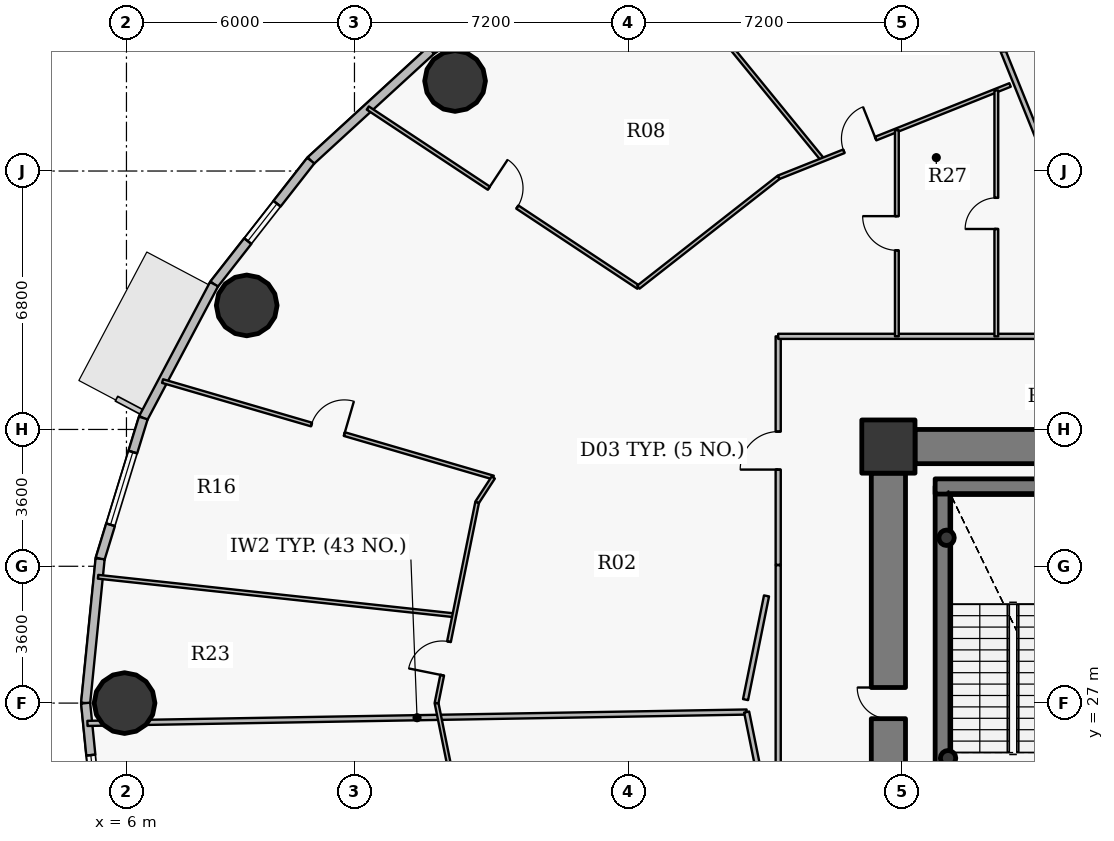
"""IFC4 building model, lengths in metres.
Left out: names, types, materials, properties, quantities, classifications, styles, units other than length and angle.
Written with IfcOpenShell. Run it as: python <this file> out.ifc"""

import sys

from ifc_helpers import new_model, si_unit, direction, frame, frame_2d, origin, origin_2d, place, context, subcontext, project, spatial, rectangle, hollow_circle, extrude, source, transform, mapped, element, fill, save


model = new_model("IFC4")
c1 = context("Model", 3, precision=1e-05, world=origin(), true_north=direction((0.0, 1.0)))
c2 = subcontext(c1, "Body", "Model", "MODEL_VIEW")
j1 = project(units=[si_unit("LENGTHUNIT", "METRE"), si_unit("PLANEANGLEUNIT", "RADIAN")], contexts=[c1])
p1 = place(None, origin())
s1 = spatial("IfcSite", under=j1, at=p1, CompositionType="ELEMENT")
p2 = place(p1, origin())
s2 = spatial("IfcBuilding", under=s1, at=p2, CompositionType="ELEMENT")
p3 = place(p2, frame((0.0, 0.0, 78.6)))
s3 = spatial("IfcBuildingStorey", under=s2, at=p3, CompositionType="ELEMENT", Elevation=78.6)
p4 = place(p3, frame((26.05, 33.75, 0.0), z_axis=(0.0, 0.0, 1.0), x_axis=(1.0, 0.0, 0.0)))
e1 = element("IfcColumn", 1, at=p4, inside=s3, PredefinedType="COLUMN", context=c2, shape_type="SweptSolid", body=[
    extrude(rectangle(XDim=1.4, YDim=1.4, at=origin_2d()), origin(), (0.0, 0.0, 1.0), 4.2),
])
p5 = place(p3, frame((27.48, 24.1, 0.0), z_axis=(0.0, 0.0, 1.0), x_axis=(0.0, 1.0, 0.0)))
e2 = element("IfcWall", 2, at=p5, inside=s3, PredefinedType="SHEAR", context=c2, shape_type="SweptSolid", body=[
    extrude(rectangle(XDim=8.6, YDim=0.4, at=frame_2d((4.3, 0.0))), origin(), (0.0, 0.0, 1.0), 4.2),
])
p6 = place(p3, frame((27.28, 32.7, 0.0), z_axis=(0.0, 0.0, 1.0), x_axis=(1.0, 0.0, 0.0)))
e3 = element("IfcWall", 3, at=p6, inside=s3, PredefinedType="SHEAR", context=c2, shape_type="SweptSolid", body=[
    extrude(rectangle(XDim=4.1, YDim=0.4, at=frame_2d((2.05, 0.0))), origin(), (0.0, 0.0, 1.0), 4.2),
])
for number, where, z_axis, x_axis in (
    (4, (27.58, 31.35, 0.0), (0.0, 0.0, 1.0), (1.0, 0.0, 0.0)),
    (5, (27.62, 25.55, 0.0), (0.0, 0.0, 1.0), (1.0, 0.0, 0.0)),
):
    element("IfcColumn", number, at=place(p3, frame(where, z_axis=z_axis, x_axis=x_axis)), inside=s3, PredefinedType="COLUMN", context=c2, shape_type="SweptSolid", body=[
        extrude(hollow_circle(Radius=0.203, WallThickness=0.016, at=origin_2d()), origin(), (0.0, 0.0, 1.0), 4.2),
    ])
p7 = place(p3, frame((26.75, 33.75, 0.0), z_axis=(0.0, 0.0, 1.0), x_axis=(1.0, 0.0, 0.0)))
e6 = element("IfcWall", 6, at=p7, inside=s3, PredefinedType="SHEAR", context=c2, shape_type="SweptSolid", body=[
    extrude(rectangle(XDim=18.5, YDim=0.9, at=frame_2d((9.25, 0.0))), origin(), (0.0, 0.0, 1.0), 3.4),
])
p8 = place(p3, frame((26.05, 20.95, 0.0), z_axis=(0.0, 0.0, 1.0), x_axis=(0.0, 1.0, 0.0)))
e7 = element("IfcWall", 7, at=p8, inside=s3, PredefinedType="SHEAR", context=c2, shape_type="SweptSolid", body=[
    extrude(rectangle(XDim=12.1, YDim=0.9, at=frame_2d((6.05, 0.0))), origin(), (0.0, 0.0, 1.0), 3.4),
])
p9 = place(p8, frame((5.64, 0.0, 0.0)))
e8 = element("IfcOpeningElement", 8, at=p9, cuts=e7, PredefinedType="OPENING", context=c2, shape_type="SweptSolid", body=[
    extrude(rectangle(XDim=0.82, YDim=2.1, at=origin_2d()), frame((0.41, 0.46, 1.05), z_axis=(0.0, -1.0, 0.0), x_axis=(1.0, 0.0, 0.0)), (0.0, 0.0, 1.0), 0.92),
])
for number, where, z_axis, x_axis in (
    (9, (14.647, 43.369, 0.0), (0.0, 0.0, 1.0), (1.0, 0.0, 0.0)),
    (10, (9.165, 37.464, 0.0), (0.0, 0.0, 1.0), (1.0, 0.0, 0.0)),
    (11, (5.95, 27.0, 0.0), (0.0, 0.0, 1.0), (1.0, 0.0, 0.0)),
):
    element("IfcColumn", number, at=place(p3, frame(where, z_axis=z_axis, x_axis=x_axis)), inside=s3, PredefinedType="COLUMN", context=c2, shape_type="SweptSolid", body=[
        extrude(hollow_circle(Radius=0.8, WallThickness=0.045, at=origin_2d()), origin(), (0.0, 0.0, 1.0), 4.2),
    ])
p10 = place(p3, frame((14.015, 44.176, 0.0), z_axis=(0.0, 0.0, 1.0), x_axis=(0.831240982525, 0.555912249343, 0.0)))
e12 = element("IfcWall", 12, at=p10, inside=s3, PredefinedType="SOLIDWALL", context=c2, shape_type="SweptSolid", body=[
    extrude(rectangle(XDim=4.46, YDim=0.24, at=frame_2d((2.23, 0.0))), origin(), (0.0, 0.0, 1.0), 3.95),
])
p11 = place(p10, frame((1.23, 0.0, 0.9)))
e13 = element("IfcOpeningElement", 13, at=p11, cuts=e12, PredefinedType="OPENING", context=c2, shape_type="SweptSolid", body=[
    extrude(rectangle(XDim=2.0, YDim=1.75, at=origin_2d()), frame((1.0, 0.13, 0.875), z_axis=(0.0, -1.0, 0.0), x_axis=(1.0, 0.0, 0.0)), (0.0, 0.0, 1.0), 0.26),
])
p12 = place(p3, frame((10.85, 41.275, 0.0), z_axis=(0.0, 0.0, 1.0), x_axis=(0.737116376281, 0.67576582321, 0.0)))
e14 = element("IfcWall", 14, at=p12, inside=s3, PredefinedType="SOLIDWALL", context=c2, shape_type="SweptSolid", body=[
    extrude(rectangle(XDim=4.294, YDim=0.24, at=frame_2d((2.147, 0.0))), origin(), (0.0, 0.0, 1.0), 3.95),
])
p13 = place(p3, frame((8.305, 38.023, 0.0), z_axis=(0.0, 0.0, 1.0), x_axis=(0.616295508253, 0.787514981767, 0.0)))
e15 = element("IfcWall", 15, at=p13, inside=s3, PredefinedType="SOLIDWALL", context=c2, shape_type="SweptSolid", body=[
    extrude(rectangle(XDim=4.129, YDim=0.24, at=frame_2d((2.065, 0.0))), origin(), (0.0, 0.0, 1.0), 3.95),
])
p14 = place(p13, frame((1.44, 0.0, 0.9)))
e16 = element("IfcOpeningElement", 16, at=p14, cuts=e15, PredefinedType="OPENING", context=c2, shape_type="SweptSolid", body=[
    extrude(rectangle(XDim=1.25, YDim=1.65, at=origin_2d()), frame((0.625, 0.13, 0.825), z_axis=(0.0, -1.0, 0.0), x_axis=(1.0, 0.0, 0.0)), (0.0, 0.0, 1.0), 0.26),
])
p15 = place(p3, frame((6.442, 34.501, 0.0), z_axis=(0.0, 0.0, 1.0), x_axis=(0.467662443071, 0.883907144072, 0.0)))
e17 = element("IfcWall", 17, at=p15, inside=s3, PredefinedType="SOLIDWALL", context=c2, shape_type="SweptSolid", body=[
    extrude(rectangle(XDim=3.984, YDim=0.24, at=frame_2d((1.992, 0.0))), origin(), (0.0, 0.0, 1.0), 3.95),
])
p16 = place(p3, frame((5.307, 30.797, 0.0), z_axis=(0.0, 0.0, 1.0), x_axis=(0.293111631758, 0.956078224482, 0.0)))
e18 = element("IfcWall", 18, at=p16, inside=s3, PredefinedType="SOLIDWALL", context=c2, shape_type="SweptSolid", body=[
    extrude(rectangle(XDim=3.875, YDim=0.24, at=frame_2d((1.938, 0.0))), origin(), (0.0, 0.0, 1.0), 3.95),
])
p17 = place(p16, frame((0.938, 0.0, 0.9)))
e19 = element("IfcOpeningElement", 19, at=p17, cuts=e18, PredefinedType="OPENING", context=c2, shape_type="SweptSolid", body=[
    extrude(rectangle(XDim=2.0, YDim=1.75, at=origin_2d()), frame((1.0, 0.13, 0.875), z_axis=(0.0, -1.0, 0.0), x_axis=(1.0, 0.0, 0.0)), (0.0, 0.0, 1.0), 0.26),
])
p18 = place(p3, frame((4.925, 27.0, 0.0), z_axis=(0.0, 0.0, 1.0), x_axis=(0.099997795174, 0.994987658698, 0.0)))
e20 = element("IfcWall", 20, at=p18, inside=s3, PredefinedType="SOLIDWALL", context=c2, shape_type="SweptSolid", body=[
    extrude(rectangle(XDim=3.816, YDim=0.24, at=frame_2d((1.908, 0.0))), origin(), (0.0, 0.0, 1.0), 3.95),
])
p19 = place(p3, frame((5.307, 23.203, 0.0), z_axis=(0.0, 0.0, 1.0), x_axis=(-0.099997795174, 0.994987658698, 0.0)))
e21 = element("IfcWall", 21, at=p19, inside=s3, PredefinedType="SOLIDWALL", context=c2, shape_type="SweptSolid", body=[
    extrude(rectangle(XDim=3.816, YDim=0.24, at=frame_2d((1.908, 0.0))), origin(), (0.0, 0.0, 1.0), 3.95),
])
p20 = place(p19, frame((0.841, 0.0, 0.9)))
e22 = element("IfcOpeningElement", 22, at=p20, cuts=e21, PredefinedType="OPENING", context=c2, shape_type="SweptSolid", body=[
    extrude(rectangle(XDim=1.6, YDim=1.75, at=origin_2d()), frame((0.8, 0.13, 0.875), z_axis=(0.0, -1.0, 0.0), x_axis=(1.0, 0.0, 0.0)), (0.0, 0.0, 1.0), 0.26),
])
p21 = place(p3, frame((4.974, 26.466, 0.0), z_axis=(0.0, 0.0, 1.0), x_axis=(0.999851881099, 0.017210922752, 0.0)))
e23 = element("IfcWall", 23, at=p21, inside=s3, PredefinedType="PARTITIONING", context=c2, shape_type="SweptSolid", body=[
    extrude(rectangle(XDim=17.349, YDim=0.135, at=frame_2d((8.674, 0.0))), origin(), (0.0, 0.0, 1.0), 3.285),
])
p22 = place(p3, frame((5.254, 30.324, 0.0), z_axis=(0.0, 0.0, 1.0), x_axis=(0.994205925685, -0.107492219871, 0.0)))
e24 = element("IfcWall", 24, at=p22, inside=s3, PredefinedType="PARTITIONING", context=c2, shape_type="SweptSolid", body=[
    extrude(rectangle(XDim=9.428, YDim=0.1, at=frame_2d((4.714, 0.0))), origin(), (0.0, 0.0, 1.0), 3.335),
])
p23 = place(p3, frame((6.951, 35.473, 0.0), z_axis=(0.0, 0.0, 1.0), x_axis=(0.959994871391, -0.280017583204, 0.0)))
e25 = element("IfcWall", 25, at=p23, inside=s3, PredefinedType="PARTITIONING", context=c2, shape_type="SweptSolid", body=[
    extrude(rectangle(XDim=9.064, YDim=0.1, at=frame_2d((4.532, 0.0))), origin(), (0.0, 0.0, 1.0), 3.335),
])
p24 = place(p23, frame((4.082, 0.0, 0.0)))
e26 = element("IfcOpeningElement", 26, at=p24, cuts=e25, PredefinedType="OPENING", context=c2, shape_type="SweptSolid", body=[
    extrude(rectangle(XDim=0.9, YDim=2.1, at=origin_2d()), frame((0.45, 0.06, 1.05), z_axis=(0.0, -1.0, 0.0), x_axis=(1.0, 0.0, 0.0)), (0.0, 0.0, 1.0), 0.12),
])
p25 = place(p3, frame((12.351, 42.657, 0.0), z_axis=(0.0, 0.0, 1.0), x_axis=(0.833801361147, -0.552064570633, 0.0)))
e27 = element("IfcWall", 27, at=p25, inside=s3, PredefinedType="PARTITIONING", context=c2, shape_type="SweptSolid", body=[
    extrude(rectangle(XDim=8.538, YDim=0.1, at=frame_2d((4.269, 0.0))), origin(), (0.0, 0.0, 1.0), 3.335),
])
p26 = place(p25, frame((3.819, 0.0, 0.0)))
e28 = element("IfcOpeningElement", 28, at=p26, cuts=e27, PredefinedType="OPENING", context=c2, shape_type="SweptSolid", body=[
    extrude(rectangle(XDim=0.9, YDim=2.1, at=origin_2d()), frame((0.45, 0.06, 1.05), z_axis=(0.0, -1.0, 0.0), x_axis=(1.0, 0.0, 0.0)), (0.0, 0.0, 1.0), 0.12),
])
p27 = place(p3, frame((14.16, 27.0, 0.0), z_axis=(0.0, 0.0, 1.0), x_axis=(0.198292702032, -0.980142848936, 0.0)))
e29 = element("IfcWall", 29, at=p27, inside=s3, PredefinedType="PARTITIONING", context=c2, shape_type="SweptSolid", body=[
    extrude(rectangle(XDim=5.392, YDim=0.1, at=frame_2d((2.696, 0.0))), origin(), (0.0, 0.0, 1.0), 3.285),
])
p28 = place(p27, frame((1.887, 0.0, 0.0)))
e30 = element("IfcOpeningElement", 30, at=p28, cuts=e29, PredefinedType="OPENING", context=c2, shape_type="SweptSolid", body=[
    extrude(rectangle(XDim=0.9, YDim=2.1, at=origin_2d()), frame((0.45, 0.06, 1.05), z_axis=(0.0, -1.0, 0.0), x_axis=(1.0, 0.0, 0.0)), (0.0, 0.0, 1.0), 0.12),
])
p29 = place(p3, frame((14.16, 27.0, 0.0), z_axis=(0.0, 0.0, 1.0), x_axis=(0.198292702032, 0.980142848936, 0.0)))
e31 = element("IfcWall", 31, at=p29, inside=s3, PredefinedType="PARTITIONING", context=c2, shape_type="SweptSolid", body=[
    extrude(rectangle(XDim=5.392, YDim=0.1, at=frame_2d((2.696, 0.0))), origin(), (0.0, 0.0, 1.0), 3.285),
])
p30 = place(p29, frame((0.749, 0.0, 0.0)))
e32 = element("IfcOpeningElement", 32, at=p30, cuts=e31, PredefinedType="OPENING", context=c2, shape_type="SweptSolid", body=[
    extrude(rectangle(XDim=0.9, YDim=2.1, at=origin_2d()), frame((0.45, 0.06, 1.05), z_axis=(0.0, -1.0, 0.0), x_axis=(1.0, 0.0, 0.0)), (0.0, 0.0, 1.0), 0.12),
])
p31 = place(p3, frame((15.229, 32.284, 0.0), z_axis=(0.0, 0.0, 1.0), x_axis=(0.545297991952, 0.838242268067, 0.0)))
e33 = element("IfcWall", 33, at=p31, inside=s3, PredefinedType="PARTITIONING", context=c2, shape_type="SweptSolid", body=[
    extrude(rectangle(XDim=0.776, YDim=0.1, at=frame_2d((0.388, 0.0))), origin(), (0.0, 0.0, 1.0), 3.95),
])
p32 = place(p3, frame((19.314, 47.425, 0.0), z_axis=(0.0, 0.0, 1.0), x_axis=(0.63263945268, -0.774446462264, 0.0)))
e34 = element("IfcWall", 34, at=p32, inside=s3, PredefinedType="PARTITIONING", context=c2, shape_type="SweptSolid", body=[
    extrude(rectangle(XDim=7.913, YDim=0.1, at=frame_2d((3.956, 0.0))), origin(), (0.0, 0.0, 1.0), 3.335),
])
p33 = place(p3, frame((19.47, 37.944, 0.0), z_axis=(0.0, 0.0, 1.0), x_axis=(0.787352286351, 0.616503347256, 0.0)))
e35 = element("IfcWall", 35, at=p33, inside=s3, PredefinedType="PARTITIONING", context=c2, shape_type="SweptSolid", body=[
    extrude(rectangle(XDim=4.69, YDim=0.1, at=frame_2d((2.345, 0.0))), origin(), (0.0, 0.0, 1.0), 3.285),
])
p34 = place(p3, frame((23.15, 30.638, 0.0), z_axis=(0.0, 0.0, 1.0), x_axis=(0.0, 1.0, 0.0)))
e36 = element("IfcWall", 36, at=p34, inside=s3, PredefinedType="PARTITIONING", context=c2, shape_type="SweptSolid", body=[
    extrude(rectangle(XDim=6.011, YDim=0.135, at=frame_2d((3.006, 0.0))), origin(), (0.0, 0.0, 1.0), 3.285),
])
p35 = place(p34, frame((2.506, 0.0, 0.0)))
e37 = element("IfcOpeningElement", 37, at=p35, cuts=e36, PredefinedType="OPENING", context=c2, shape_type="SweptSolid", body=[
    extrude(rectangle(XDim=1.0, YDim=2.15, at=origin_2d()), frame((0.5, 0.078, 1.075), z_axis=(0.0, -1.0, 0.0), x_axis=(1.0, 0.0, 0.0)), (0.0, 0.0, 1.0), 0.155),
])
p36 = place(p3, frame((23.15, 36.65, 0.0), z_axis=(0.0, 0.0, 1.0), x_axis=(1.0, 0.0, 0.0)))
e38 = element("IfcWall", 38, at=p36, inside=s3, PredefinedType="PARTITIONING", context=c2, shape_type="SweptSolid", body=[
    extrude(rectangle(XDim=7.171, YDim=0.135, at=frame_2d((3.586, 0.0))), origin(), (0.0, 0.0, 1.0), 3.285),
])
p37 = place(p3, frame((23.163, 40.835, 0.0), z_axis=(0.0, 0.0, 1.0), x_axis=(0.928799979038, 0.370581433613, 0.0)))
e39 = element("IfcWall", 39, at=p37, inside=s3, PredefinedType="PARTITIONING", context=c2, shape_type="SweptSolid", body=[
    extrude(rectangle(XDim=6.555, YDim=0.1, at=frame_2d((3.278, 0.0))), origin(), (0.0, 0.0, 1.0), 3.285),
])
p38 = place(p37, frame((1.847, 0.0, 0.0)))
e40 = element("IfcOpeningElement", 40, at=p38, cuts=e39, PredefinedType="OPENING", context=c2, shape_type="SweptSolid", body=[
    extrude(rectangle(XDim=0.9, YDim=2.1, at=origin_2d()), frame((0.45, 0.06, 1.05), z_axis=(0.0, -1.0, 0.0), x_axis=(1.0, 0.0, 0.0)), (0.0, 0.0, 1.0), 0.12),
])
p39 = place(p3, frame((26.272, 36.65, 0.0), z_axis=(0.0, 0.0, 1.0), x_axis=(0.0, 1.0, 0.0)))
e41 = element("IfcWall", 41, at=p39, inside=s3, PredefinedType="PARTITIONING", context=c2, shape_type="SweptSolid", body=[
    extrude(rectangle(XDim=5.426, YDim=0.1, at=frame_2d((2.713, 0.0))), origin(), (0.0, 0.0, 1.0), 3.95),
])
p40 = place(p39, frame((2.263, 0.0, 0.0)))
e42 = element("IfcOpeningElement", 42, at=p40, cuts=e41, PredefinedType="OPENING", context=c2, shape_type="SweptSolid", body=[
    extrude(rectangle(XDim=0.9, YDim=2.1, at=origin_2d()), frame((0.45, 0.06, 1.05), z_axis=(0.0, -1.0, 0.0), x_axis=(1.0, 0.0, 0.0)), (0.0, 0.0, 1.0), 0.12),
])
p41 = place(p3, frame((26.641, 50.166, 0.0), z_axis=(0.0, 0.0, 1.0), x_axis=(0.374600258899, -0.927186413852, 0.0)))
e43 = element("IfcWall", 43, at=p41, inside=s3, PredefinedType="PARTITIONING", context=c2, shape_type="SweptSolid", body=[
    extrude(rectangle(XDim=13.945, YDim=0.135, at=frame_2d((6.972, 0.0))), origin(), (0.0, 0.0, 1.0), 3.285),
])
p42 = place(p3, frame((28.89, 36.65, 0.0), z_axis=(0.0, 0.0, 1.0), x_axis=(0.0, 1.0, 0.0)))
e44 = element("IfcWall", 44, at=p42, inside=s3, PredefinedType="PARTITIONING", context=c2, shape_type="SweptSolid", body=[
    extrude(rectangle(XDim=6.47, YDim=0.1, at=frame_2d((3.235, 0.0))), origin(), (0.0, 0.0, 1.0), 3.95),
])
p43 = place(p42, frame((2.825, 0.0, 0.0)))
e45 = element("IfcOpeningElement", 45, at=p43, cuts=e44, PredefinedType="OPENING", context=c2, shape_type="SweptSolid", body=[
    extrude(rectangle(XDim=0.82, YDim=2.1, at=origin_2d()), frame((0.41, 0.06, 1.05), z_axis=(0.0, -1.0, 0.0), x_axis=(1.0, 0.0, 0.0)), (0.0, 0.0, 1.0), 0.12),
])
p44 = place(p3, frame((23.15, 23.372, 0.0), z_axis=(0.0, 0.0, 1.0), x_axis=(0.0, 1.0, 0.0)))
e46 = element("IfcWall", 46, at=p44, inside=s3, PredefinedType="PARTITIONING", context=c2, shape_type="SweptSolid", body=[
    extrude(rectangle(XDim=7.257, YDim=0.135, at=frame_2d((3.628, 0.0))), origin(), (0.0, 0.0, 1.0), 3.285),
])
p45 = place(p3, frame((26.74, 34.2, 0.0), z_axis=(0.0, 0.0, 1.0), x_axis=(-1.0, 0.0, 0.0)))
e47 = element("IfcWall", 47, at=p45, inside=s3, PredefinedType="PARTITIONING", context=c2, shape_type="SweptSolid", body=[
    extrude(rectangle(XDim=1.14, YDim=0.135, at=frame_2d((0.57, 0.0))), origin(), (0.0, 0.0, 1.0), 3.285),
])
p46 = place(p3, frame((25.6, 33.893, 0.0), z_axis=(0.0, 0.0, 1.0), x_axis=(0.0, -1.0, 0.0)))
e48 = element("IfcWall", 48, at=p46, inside=s3, PredefinedType="PARTITIONING", context=c2, shape_type="SweptSolid", body=[
    extrude(rectangle(XDim=0.833, YDim=0.135, at=frame_2d((0.416, 0.0))), origin(), (0.0, 0.0, 1.0), 3.95),
])
p47 = place(p3, frame((22.843, 29.82, 0.0), z_axis=(0.0, 0.0, 1.0), x_axis=(-0.198274261102, -0.98014657954, 0.0)))
e49 = element("IfcWall", 49, at=p47, inside=s3, PredefinedType="PARTITIONING", context=c2, shape_type="SweptSolid", body=[
    extrude(rectangle(XDim=2.784, YDim=0.135, at=frame_2d((1.392, 0.0))), origin(), (0.0, 0.0, 1.0), 3.285),
])
p48 = place(p3, frame((22.32, 26.765, 0.0), z_axis=(0.0, 0.0, 1.0), x_axis=(0.198287516938, -0.980143897918, 0.0)))
e50 = element("IfcWall", 50, at=p48, inside=s3, PredefinedType="PARTITIONING", context=c2, shape_type="SweptSolid", body=[
    extrude(rectangle(XDim=2.637, YDim=0.135, at=frame_2d((1.319, 0.0))), origin(), (0.0, 0.0, 1.0), 3.95),
])
m1 = source(origin(), c2, "Body", "SweptSolid", [
    extrude(rectangle(XDim=2.0, YDim=1.75, at=origin_2d()), frame((1.0, 0.03, 0.875), z_axis=(0.0, -1.0, 0.0), x_axis=(1.0, 0.0, 0.0)), (0.0, 0.0, 1.0), 0.06),
])
p49 = place(p17, origin())
e51 = element("IfcWindow", 51, at=p49, inside=s3, PartitioningType="DOUBLE_PANEL_VERTICAL", PredefinedType="WINDOW", context=c2, shape_type="MappedRepresentation", body=[
    mapped(m1, transform((0.0, 0.0, 0.0), x_axis=(1.0, 0.0, 0.0), y_axis=(0.0, 1.0, 0.0), z_axis=(0.0, 0.0, 1.0), scale=1.0)),
])
fill(e19, e51)
m2 = source(origin(), c2, "Body", "SweptSolid", [
    extrude(rectangle(XDim=1.6, YDim=1.75, at=origin_2d()), frame((0.8, 0.03, 0.875), z_axis=(0.0, -1.0, 0.0), x_axis=(1.0, 0.0, 0.0)), (0.0, 0.0, 1.0), 0.06),
])
p50 = place(p20, origin())
e52 = element("IfcWindow", 52, at=p50, inside=s3, PartitioningType="DOUBLE_PANEL_VERTICAL", PredefinedType="WINDOW", context=c2, shape_type="MappedRepresentation", body=[
    mapped(m2, transform((0.0, 0.0, 0.0), x_axis=(1.0, 0.0, 0.0), y_axis=(0.0, 1.0, 0.0), z_axis=(0.0, 0.0, 1.0), scale=1.0)),
])
fill(e22, e52)
m3 = source(origin(), c2, "Body", "SweptSolid", [
    extrude(rectangle(XDim=1.25, YDim=1.65, at=origin_2d()), frame((0.625, 0.03, 0.825), z_axis=(0.0, -1.0, 0.0), x_axis=(1.0, 0.0, 0.0)), (0.0, 0.0, 1.0), 0.06),
])
p51 = place(p14, origin())
e53 = element("IfcWindow", 53, at=p51, inside=s3, PartitioningType="SINGLE_PANEL", PredefinedType="WINDOW", context=c2, shape_type="MappedRepresentation", body=[
    mapped(m3, transform((0.0, 0.0, 0.0), x_axis=(1.0, 0.0, 0.0), y_axis=(0.0, 1.0, 0.0), z_axis=(0.0, 0.0, 1.0), scale=1.0)),
])
fill(e16, e53)
m4 = source(origin(), c2, "Body", "SweptSolid", [
    extrude(rectangle(XDim=0.82, YDim=2.1, at=origin_2d()), frame((0.41, 0.025, 1.05), z_axis=(0.0, -1.0, 0.0), x_axis=(1.0, 0.0, 0.0)), (0.0, 0.0, 1.0), 0.05),
])
p52 = place(p9, origin())
e54 = element("IfcDoor", 54, at=p52, inside=s3, OperationType="SINGLE_SWING_RIGHT", PredefinedType="DOOR", context=c2, shape_type="MappedRepresentation", body=[
    mapped(m4, transform((0.0, 0.0, 0.0), x_axis=(1.0, 0.0, 0.0), y_axis=(0.0, 1.0, 0.0), z_axis=(0.0, 0.0, 1.0), scale=1.0)),
])
fill(e8, e54)
m5 = source(origin(), c2, "Body", "SweptSolid", [
    extrude(rectangle(XDim=1.0, YDim=2.15, at=origin_2d()), frame((0.5, 0.025, 1.075), z_axis=(0.0, -1.0, 0.0), x_axis=(1.0, 0.0, 0.0)), (0.0, 0.0, 1.0), 0.05),
])
p53 = place(p35, origin())
e55 = element("IfcDoor", 55, at=p53, inside=s3, OperationType="SINGLE_SWING_LEFT", PredefinedType="DOOR", context=c2, shape_type="MappedRepresentation", body=[
    mapped(m5, transform((0.0, 0.0, 0.0), x_axis=(1.0, 0.0, 0.0), y_axis=(0.0, 1.0, 0.0), z_axis=(0.0, 0.0, 1.0), scale=1.0)),
])
fill(e37, e55)
m6 = source(origin(), c2, "Body", "SweptSolid", [
    extrude(rectangle(XDim=0.9, YDim=2.1, at=origin_2d()), frame((0.45, 0.025, 1.05), z_axis=(0.0, -1.0, 0.0), x_axis=(1.0, 0.0, 0.0)), (0.0, 0.0, 1.0), 0.05),
])
p54 = place(p38, origin())
e56 = element("IfcDoor", 56, at=p54, inside=s3, OperationType="SINGLE_SWING_RIGHT", PredefinedType="DOOR", context=c2, shape_type="MappedRepresentation", body=[
    mapped(m6, transform((0.0, 0.0, 0.0), x_axis=(1.0, 0.0, 0.0), y_axis=(0.0, 1.0, 0.0), z_axis=(0.0, 0.0, 1.0), scale=1.0)),
])
fill(e40, e56)
p55 = place(p26, origin())
e57 = element("IfcDoor", 57, at=p55, inside=s3, OperationType="SINGLE_SWING_LEFT", PredefinedType="DOOR", context=c2, shape_type="MappedRepresentation", body=[
    mapped(m6, transform((0.0, 0.0, 0.0), x_axis=(1.0, 0.0, 0.0), y_axis=(0.0, 1.0, 0.0), z_axis=(0.0, 0.0, 1.0), scale=1.0)),
])
fill(e28, e57)
p56 = place(p24, origin())
e58 = element("IfcDoor", 58, at=p56, inside=s3, OperationType="SINGLE_SWING_RIGHT", PredefinedType="DOOR", context=c2, shape_type="MappedRepresentation", body=[
    mapped(m6, transform((0.0, 0.0, 0.0), x_axis=(1.0, 0.0, 0.0), y_axis=(0.0, 1.0, 0.0), z_axis=(0.0, 0.0, 1.0), scale=1.0)),
])
fill(e26, e58)
p57 = place(p30, origin())
e59 = element("IfcDoor", 59, at=p57, inside=s3, OperationType="SINGLE_SWING_LEFT", PredefinedType="DOOR", context=c2, shape_type="MappedRepresentation", body=[
    mapped(m6, transform((0.0, 0.0, 0.0), x_axis=(1.0, 0.0, 0.0), y_axis=(0.0, 1.0, 0.0), z_axis=(0.0, 0.0, 1.0), scale=1.0)),
])
fill(e32, e59)
p58 = place(p40, origin())
e60 = element("IfcDoor", 60, at=p58, inside=s3, OperationType="SINGLE_SWING_RIGHT", PredefinedType="DOOR", context=c2, shape_type="MappedRepresentation", body=[
    mapped(m6, transform((0.0, 0.0, 0.0), x_axis=(1.0, 0.0, 0.0), y_axis=(0.0, 1.0, 0.0), z_axis=(0.0, 0.0, 1.0), scale=1.0)),
])
fill(e42, e60)
p59 = place(p43, origin())
e61 = element("IfcDoor", 61, at=p59, inside=s3, OperationType="SINGLE_SWING_LEFT", PredefinedType="DOOR", context=c2, shape_type="MappedRepresentation", body=[
    mapped(m4, transform((0.0, 0.0, 0.0), x_axis=(1.0, 0.0, 0.0), y_axis=(0.0, 1.0, 0.0), z_axis=(0.0, 0.0, 1.0), scale=1.0)),
])
fill(e45, e61)
save(model, sys.argv[1])
